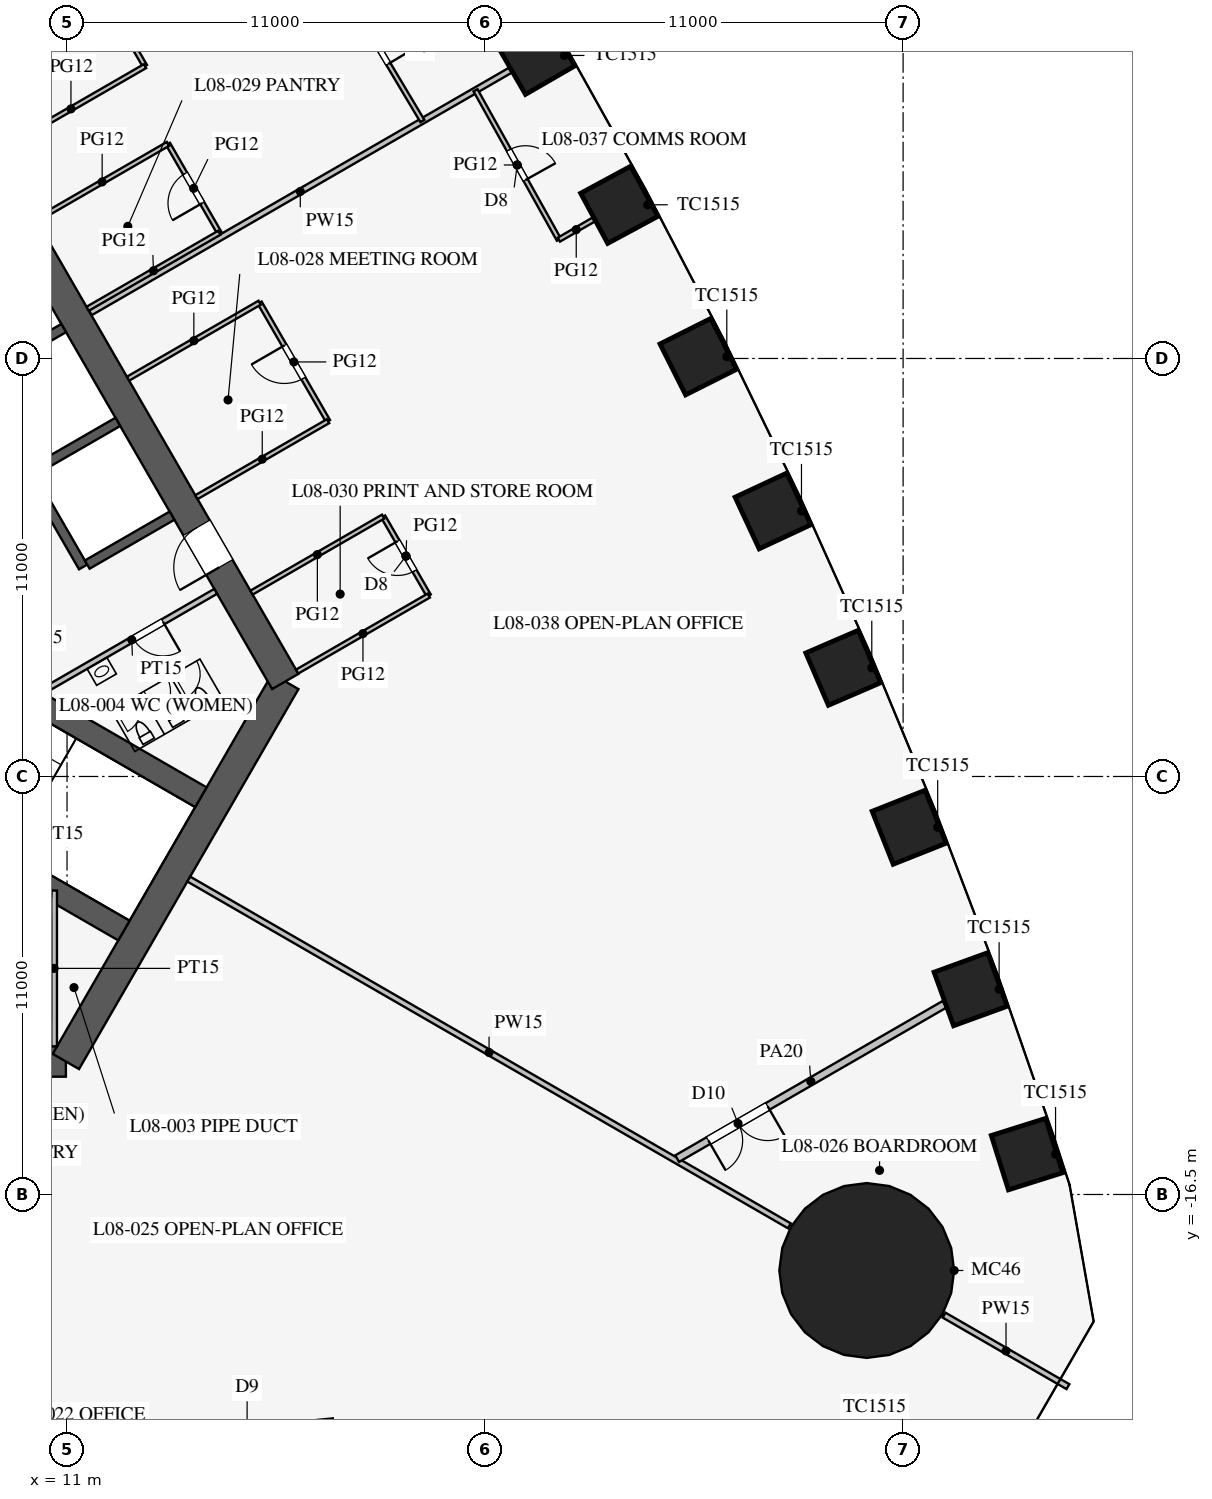
"""IFC4 building model, lengths in metres.
Left out: names, types, materials, properties, quantities, classifications, styles, units other than length and angle.
Written with IfcOpenShell. Run it as: python <this file> out.ifc"""

import sys

from ifc_helpers import new_model, si_unit, direction, frame, frame_2d, origin, origin_2d, place, context, subcontext, project, spatial, rectangle, circle, extrude, element, fill, save


model = new_model("IFC4")
c1 = context("Model", 3, precision=1e-05, world=origin(), true_north=direction((0.0, 1.0)))
c2 = subcontext(c1, "Body", "Model", "MODEL_VIEW")
j1 = project(units=[si_unit("LENGTHUNIT", "METRE"), si_unit("PLANEANGLEUNIT", "RADIAN")], contexts=[c1])
p1 = place(None, origin())
s1 = spatial("IfcSite", under=j1, at=p1, CompositionType="ELEMENT")
p2 = place(p1, origin())
s2 = spatial("IfcBuilding", under=s1, at=p2, CompositionType="ELEMENT")
p3 = place(p2, frame((0.0, 0.0, 37.5)))
s3 = spatial("IfcBuildingStorey", under=s2, at=p3, CompositionType="ELEMENT", Elevation=37.5)
for number, where, z_axis, x_axis in (
    (1, (36.262, -15.438, 0.0), (0.0, 0.0, 1.0), (-0.3, 0.954, 0.0)),
    (2, (34.776, -11.099, 0.0), (0.0, 0.0, 1.0), (-0.342, 0.94, 0.0)),
    (3, (33.16, -6.836, 0.0), (0.0, 0.0, 1.0), (-0.369, 0.929, 0.0)),
    (4, (31.426, -2.641, 0.0), (0.0, 0.0, 1.0), (-0.396, 0.918, 0.0)),
    (5, (29.576, 1.487, 0.0), (0.0, 0.0, 1.0), (-0.423, 0.906, 0.0)),
    (6, (27.611, 5.549, 0.0), (0.0, 0.0, 1.0), (-0.449, 0.894, 0.0)),
    (7, (25.531, 9.544, 0.0), (0.0, 0.0, 1.0), (-0.475, 0.88, 0.0)),
    (8, (23.338, 13.474, 0.0), (0.0, 0.0, 1.0), (-0.5, 0.866, 0.0)),
):
    element("IfcColumn", number, at=place(p3, frame(where, z_axis=z_axis, x_axis=x_axis)), inside=s3, PredefinedType="COLUMN", context=c2, shape_type="SweptSolid", body=[
        extrude(rectangle(XDim=1.5, YDim=1.5, at=origin_2d()), origin(), (0.0, 0.0, 1.0), 4.2),
    ])
p4 = place(p3, frame((32.043, -18.5, 0.0), z_axis=(0.0, 0.0, 1.0), x_axis=(1.0, 0.0, 0.0)))
e9 = element("IfcColumn", 9, at=p4, inside=s3, PredefinedType="COLUMN", context=c2, shape_type="SweptSolid", body=[
    extrude(circle(Radius=2.3, at=origin_2d()), origin(), (0.0, 0.0, 1.0), 4.2),
])
p5 = place(p3, frame((-10.97, -13.0, 0.0), z_axis=(0.0, 0.0, 1.0), x_axis=(1.0, 0.0, 0.0)))
e10 = element("IfcWall", 10, at=p5, inside=s3, PredefinedType="SHEAR", context=c2, shape_type="SweptSolid", body=[
    extrude(rectangle(XDim=21.939, YDim=0.8, at=frame_2d((10.97, 0.0))), origin(), (0.0, 0.0, 1.0), 4.2),
])
p6 = place(p5, frame((17.27, 0.0, 0.0)))
e11 = element("IfcOpeningElement", 11, at=p6, cuts=e10, PredefinedType="OPENING", context=c2, shape_type="SweptSolid", body=[
    extrude(rectangle(XDim=1.2, YDim=2.1, at=frame_2d((0.6, 1.05))), frame((0.0, 0.41, 0.0), z_axis=(0.0, -1.0, 0.0), x_axis=(1.0, 0.0, 0.0)), (0.0, 0.0, 1.0), 0.82),
])
p7 = place(p5, frame((3.47, 0.0, 0.0)))
e12 = element("IfcOpeningElement", 12, at=p7, cuts=e10, PredefinedType="OPENING", context=c2, shape_type="SweptSolid", body=[
    extrude(rectangle(XDim=1.2, YDim=2.1, at=frame_2d((0.6, 1.05))), frame((0.0, 0.41, 0.0), z_axis=(0.0, -1.0, 0.0), x_axis=(1.0, 0.0, 0.0)), (0.0, 0.0, 1.0), 0.82),
])
p8 = place(p3, frame((10.97, -13.0, 0.0), z_axis=(0.0, 0.0, 1.0), x_axis=(0.499995765644, 0.866027848477, 0.0)))
e13 = element("IfcWall", 13, at=p8, inside=s3, PredefinedType="SHEAR", context=c2, shape_type="SweptSolid", body=[
    extrude(rectangle(XDim=11.547, YDim=0.8, at=frame_2d((5.773, 0.0))), origin(), (0.0, 0.0, 1.0), 4.2),
])
p9 = place(p3, frame((16.743, -3.0, 0.0), z_axis=(0.0, 0.0, 1.0), x_axis=(-0.500002442456, 0.866023993627, 0.0)))
e14 = element("IfcWall", 14, at=p9, inside=s3, PredefinedType="SHEAR", context=c2, shape_type="SweptSolid", body=[
    extrude(rectangle(XDim=21.939, YDim=0.8, at=frame_2d((10.97, 0.0))), origin(), (0.0, 0.0, 1.0), 4.2),
])
p10 = place(p9, frame((17.27, 0.0, 0.0)))
e15 = element("IfcOpeningElement", 15, at=p10, cuts=e14, PredefinedType="OPENING", context=c2, shape_type="SweptSolid", body=[
    extrude(rectangle(XDim=1.2, YDim=2.1, at=frame_2d((0.6, 1.05))), frame((0.0, 0.41, 0.0), z_axis=(0.0, -1.0, 0.0), x_axis=(1.0, 0.0, 0.0)), (0.0, 0.0, 1.0), 0.82),
])
p11 = place(p9, frame((3.47, 0.0, 0.0)))
e16 = element("IfcOpeningElement", 16, at=p11, cuts=e14, PredefinedType="OPENING", context=c2, shape_type="SweptSolid", body=[
    extrude(rectangle(XDim=1.2, YDim=2.1, at=frame_2d((0.6, 1.05))), frame((0.0, 0.41, 0.0), z_axis=(0.0, -1.0, 0.0), x_axis=(1.0, 0.0, 0.0)), (0.0, 0.0, 1.0), 0.82),
])
p12 = place(p3, frame((11.424, 0.014, 0.0), z_axis=(0.0, 0.0, 1.0), x_axis=(-0.500001763848, 0.866024385424, 0.0)))
e17 = element("IfcWall", 17, at=p12, inside=s3, PredefinedType="SHEAR", context=c2, shape_type="SweptSolid", body=[
    extrude(rectangle(XDim=11.4, YDim=0.25, at=frame_2d((5.7, 0.0))), origin(), (0.0, 0.0, 1.0), 4.2),
])
for number, where, z_axis, x_axis in (
    (18, (11.532, 0.076, 0.0), (0.0, 0.0, 1.0), (0.866, 0.5, 0.0)),
    (19, (10.107, 2.544, 0.0), (0.0, 0.0, 1.0), (0.866, 0.5, 0.0)),
    (20, (8.682, 5.012, 0.0), (0.0, 0.0, 1.0), (0.866, 0.5, 0.0)),
):
    element("IfcWall", number, at=place(p3, frame(where, z_axis=z_axis, x_axis=x_axis)), inside=s3, PredefinedType="SHEAR", context=c2, shape_type="SweptSolid", body=[
        extrude(rectangle(XDim=2.575, YDim=0.25, at=frame_2d((1.288, 0.0))), origin(), (0.0, 0.0, 1.0), 4.2),
    ])
for number, where, z_axis, x_axis in (
    (21, (4.638, -5.016, 0.0), (0.0, 0.0, 1.0), (0.866, -0.5, 0.0)),
    (22, (6.663, -1.509, 0.0), (0.0, 0.0, 1.0), (0.866, -0.5, 0.0)),
):
    element("IfcWall", number, at=place(p3, frame(where, z_axis=z_axis, x_axis=x_axis)), inside=s3, PredefinedType="SHEAR", context=c2, shape_type="SweptSolid", body=[
        extrude(rectangle(XDim=9.075, YDim=0.6, at=frame_2d((4.538, 0.0))), origin(), (0.0, 0.0, 1.0), 4.2),
    ])
p13 = place(p3, frame((10.495, -3.178, 0.0), z_axis=(0.0, 0.0, 1.0), x_axis=(0.86602216432, 0.500005610874, 0.0)))
e23 = element("IfcWall", 23, at=p13, inside=s3, PredefinedType="PARTITIONING", context=c2, shape_type="SweptSolid", body=[
    extrude(rectangle(XDim=5.1, YDim=0.15, at=frame_2d((2.55, 0.0))), origin(), (0.0, 0.0, 1.0), 4.0),
])
p14 = place(p13, frame((2.6, 0.0, 0.0)))
e24 = element("IfcOpeningElement", 24, at=p14, cuts=e23, PredefinedType="OPENING", context=c2, shape_type="SweptSolid", body=[
    extrude(rectangle(XDim=0.9, YDim=2.1, at=frame_2d((0.45, 1.05))), frame((0.0, 0.085, 0.0), z_axis=(0.0, -1.0, 0.0), x_axis=(1.0, 0.0, 0.0)), (0.0, 0.0, 1.0), 0.17),
])
p15 = place(p3, frame((10.66, -8.5, 0.0), z_axis=(0.0, 0.0, 1.0), x_axis=(0.0, -1.0, 0.0)))
e25 = element("IfcWall", 25, at=p15, inside=s3, PredefinedType="PARTITIONING", context=c2, shape_type="SweptSolid", body=[
    extrude(rectangle(XDim=4.1, YDim=0.15, at=frame_2d((2.05, 0.0))), origin(), (0.0, 0.0, 1.0), 4.0),
])
p16 = place(p3, frame((14.203, -8.2, 0.0), z_axis=(0.0, 0.0, 1.0), x_axis=(0.866024965723, -0.500000758745, 0.0)))
e26 = element("IfcWall", 26, at=p16, inside=s3, PredefinedType="PARTITIONING", context=c2, shape_type="SweptSolid", body=[
    extrude(rectangle(XDim=18.25, YDim=0.15, at=frame_2d((9.125, 0.0))), origin(), (0.0, 0.0, 1.0), 2.3),
])
p17 = place(p3, frame((34.078, -19.675, 0.0), z_axis=(0.0, 0.0, 1.0), x_axis=(0.866019247219, -0.500010663332, 0.0)))
e27 = element("IfcWall", 27, at=p17, inside=s3, PredefinedType="PARTITIONING", context=c2, shape_type="SweptSolid", body=[
    extrude(rectangle(XDim=3.764, YDim=0.15, at=frame_2d((1.882, 0.0))), origin(), (0.0, 0.0, 1.0), 2.3),
])
p18 = place(p3, frame((13.5, -22.91, 0.0), z_axis=(0.0, 0.0, 1.0), x_axis=(0.994833141332, 0.101523499286, 0.0)))
e28 = element("IfcWall", 28, at=p18, inside=s3, PredefinedType="PARTITIONING", context=c2, shape_type="SweptSolid", body=[
    extrude(rectangle(XDim=4.523, YDim=0.12, at=frame_2d((2.262, 0.0))), origin(), (0.0, 0.0, 1.0), 2.9),
])
p19 = place(p18, frame((1.75, 0.0, 0.15)))
e29 = element("IfcOpeningElement", 29, at=p19, cuts=e28, PredefinedType="OPENING", context=c2, shape_type="SweptSolid", body=[
    extrude(rectangle(XDim=1.0, YDim=2.1, at=frame_2d((0.5, 1.05))), frame((0.0, 0.07, 0.0), z_axis=(0.0, -1.0, 0.0), x_axis=(1.0, 0.0, 0.0)), (0.0, 0.0, 1.0), 0.14),
])
p20 = place(p3, frame((11.613, 6.705, 0.0), z_axis=(0.0, 0.0, 1.0), x_axis=(0.86602785495, 0.499995754432, 0.0)))
e30 = element("IfcWall", 30, at=p20, inside=s3, PredefinedType="PARTITIONING", context=c2, shape_type="SweptSolid", body=[
    extrude(rectangle(XDim=12.759, YDim=0.15, at=frame_2d((6.379, 0.0))), origin(), (0.0, 0.0, 1.0), 3.2),
])
p21 = place(p3, frame((15.006, 8.808, 0.0), z_axis=(0.0, 0.0, 1.0), x_axis=(-0.500048589285, 0.86599734893, 0.0)))
e31 = element("IfcWall", 31, at=p21, inside=s3, PredefinedType="PARTITIONING", context=c2, shape_type="SweptSolid", body=[
    extrude(rectangle(XDim=2.7, YDim=0.12, at=frame_2d((1.35, 0.0))), origin(), (0.0, 0.0, 1.0), 2.9),
])
p22 = place(p21, frame((0.9, 0.0, 0.15)))
e32 = element("IfcOpeningElement", 32, at=p22, cuts=e31, PredefinedType="OPENING", context=c2, shape_type="SweptSolid", body=[
    extrude(rectangle(XDim=0.9, YDim=2.1, at=frame_2d((0.45, 1.05))), frame((0.0, 0.07, 0.0), z_axis=(0.0, -1.0, 0.0), x_axis=(1.0, 0.0, 0.0)), (0.0, 0.0, 1.0), 0.14),
])
p23 = place(p3, frame((13.052, 13.194, 0.0), z_axis=(0.0, 0.0, 1.0), x_axis=(-0.499977259774, 0.866038532462, 0.0)))
e33 = element("IfcWall", 33, at=p23, inside=s3, PredefinedType="PARTITIONING", context=c2, shape_type="SweptSolid", body=[
    extrude(rectangle(XDim=4.7, YDim=0.12, at=frame_2d((2.35, 0.0))), origin(), (0.0, 0.0, 1.0), 2.9),
])
p24 = place(p23, frame((1.45, 0.0, 0.15)))
e34 = element("IfcOpeningElement", 34, at=p24, cuts=e33, PredefinedType="OPENING", context=c2, shape_type="SweptSolid", body=[
    extrude(rectangle(XDim=1.8, YDim=2.1, at=frame_2d((0.9, 1.05))), frame((0.0, 0.07, 0.0), z_axis=(0.0, -1.0, 0.0), x_axis=(1.0, 0.0, 0.0)), (0.0, 0.0, 1.0), 0.14),
])
p25 = place(p3, frame((20.519, -0.74, 0.0), z_axis=(0.0, 0.0, 1.0), x_axis=(-0.499957262057, 0.866050077142, 0.0)))
e35 = element("IfcWall", 35, at=p25, inside=s3, PredefinedType="PARTITIONING", context=c2, shape_type="SweptSolid", body=[
    extrude(rectangle(XDim=2.4, YDim=0.12, at=frame_2d((1.2, 0.0))), origin(), (0.0, 0.0, 1.0), 2.9),
])
p26 = place(p25, frame((0.75, 0.0, 0.15)))
e36 = element("IfcOpeningElement", 36, at=p26, cuts=e35, PredefinedType="OPENING", context=c2, shape_type="SweptSolid", body=[
    extrude(rectangle(XDim=0.9, YDim=2.1, at=frame_2d((0.45, 1.05))), frame((0.0, 0.07, 0.0), z_axis=(0.0, -1.0, 0.0), x_axis=(1.0, 0.0, 0.0)), (0.0, 0.0, 1.0), 0.14),
])
p27 = place(p3, frame((17.869, 3.85, 0.0), z_axis=(0.0, 0.0, 1.0), x_axis=(-0.500012057535, 0.866018442252, 0.0)))
e37 = element("IfcWall", 37, at=p27, inside=s3, PredefinedType="PARTITIONING", context=c2, shape_type="SweptSolid", body=[
    extrude(rectangle(XDim=3.6, YDim=0.12, at=frame_2d((1.8, 0.0))), origin(), (0.0, 0.0, 1.0), 2.9),
])
p28 = place(p27, frame((1.3, 0.0, 0.15)))
e38 = element("IfcOpeningElement", 38, at=p28, cuts=e37, PredefinedType="OPENING", context=c2, shape_type="SweptSolid", body=[
    extrude(rectangle(XDim=1.0, YDim=2.1, at=frame_2d((0.5, 1.05))), frame((0.0, 0.07, 0.0), z_axis=(0.0, -1.0, 0.0), x_axis=(1.0, 0.0, 0.0)), (0.0, 0.0, 1.0), 0.14),
])
for number, where, z_axis, x_axis in (
    (39, (11.542, 6.808, 0.0), (0.0, 0.0, 1.0), (0.866, 0.5, 0.0)),
    (40, (10.192, 9.146, 0.0), (0.0, 0.0, 1.0), (0.866, 0.5, 0.0)),
):
    element("IfcWall", number, at=place(p3, frame(where, z_axis=z_axis, x_axis=x_axis)), inside=s3, PredefinedType="PARTITIONING", context=c2, shape_type="SweptSolid", body=[
        extrude(rectangle(XDim=4.0, YDim=0.12, at=frame_2d((2.0, 0.0))), origin(), (0.0, 0.0, 1.0), 2.9),
    ])
p29 = place(p3, frame((9.155, 10.944, 0.0), z_axis=(0.0, 0.0, 1.0), x_axis=(0.866017533419, 0.500013631625, 0.0)))
e41 = element("IfcWall", 41, at=p29, inside=s3, PredefinedType="PARTITIONING", context=c2, shape_type="SweptSolid", body=[
    extrude(rectangle(XDim=4.5, YDim=0.12, at=frame_2d((2.25, 0.0))), origin(), (0.0, 0.0, 1.0), 2.9),
])
for number, where, z_axis, x_axis in (
    (42, (17.055, -2.74, 0.0), (0.0, 0.0, 1.0), (0.866, 0.5, 0.0)),
    (43, (12.605, 4.968, 0.0), (0.0, 0.0, 1.0), (0.866, 0.5, 0.0)),
    (44, (14.405, 1.85, 0.0), (0.0, 0.0, 1.0), (0.866, 0.5, 0.0)),
    (45, (15.855, -0.661, 0.0), (0.0, 0.0, 1.0), (0.866, 0.5, 0.0)),
):
    element("IfcWall", number, at=place(p3, frame(where, z_axis=z_axis, x_axis=x_axis)), inside=s3, PredefinedType="PARTITIONING", context=c2, shape_type="SweptSolid", body=[
        extrude(rectangle(XDim=4.0, YDim=0.12, at=frame_2d((2.0, 0.0))), origin(), (0.0, 0.0, 1.0), 2.9),
    ])
p30 = place(p3, frame((20.351, 11.749, 0.0), z_axis=(0.0, 0.0, 1.0), x_axis=(-0.51252396108, 0.858672923364, 0.0)))
e46 = element("IfcWall", 46, at=p30, inside=s3, PredefinedType="PARTITIONING", context=c2, shape_type="SweptSolid", body=[
    extrude(rectangle(XDim=4.5, YDim=0.12, at=frame_2d((2.25, 0.0))), origin(), (0.0, 0.0, 1.0), 2.9),
])
p31 = place(p30, frame((1.75, 0.0, 0.15)))
e47 = element("IfcOpeningElement", 47, at=p31, cuts=e46, PredefinedType="OPENING", context=c2, shape_type="SweptSolid", body=[
    extrude(rectangle(XDim=1.0, YDim=2.1, at=frame_2d((0.5, 1.05))), frame((0.0, 0.07, 0.0), z_axis=(0.0, -1.0, 0.0), x_axis=(1.0, 0.0, 0.0)), (0.0, 0.0, 1.0), 0.14),
])
p32 = place(p3, frame((23.943, 8.627, 0.0), z_axis=(0.0, 0.0, 1.0), x_axis=(-0.487415216275, 0.87317031955, 0.0)))
e48 = element("IfcWall", 48, at=p32, inside=s3, PredefinedType="PARTITIONING", context=c2, shape_type="SweptSolid", body=[
    extrude(rectangle(XDim=4.5, YDim=0.12, at=frame_2d((2.25, 0.0))), origin(), (0.0, 0.0, 1.0), 2.9),
])
p33 = place(p32, frame((1.8, 0.0, 0.15)))
e49 = element("IfcOpeningElement", 49, at=p33, cuts=e48, PredefinedType="OPENING", context=c2, shape_type="SweptSolid", body=[
    extrude(rectangle(XDim=0.9, YDim=2.1, at=frame_2d((0.45, 1.05))), frame((0.0, 0.07, 0.0), z_axis=(0.0, -1.0, 0.0), x_axis=(1.0, 0.0, 0.0)), (0.0, 0.0, 1.0), 0.14),
])
p34 = place(p3, frame((27.055, -15.557, 0.0), z_axis=(0.0, 0.0, 1.0), x_axis=(0.866026445548, 0.499998195608, 0.0)))
e50 = element("IfcWall", 50, at=p34, inside=s3, PredefinedType="PARTITIONING", context=c2, shape_type="SweptSolid", body=[
    extrude(rectangle(XDim=8.124, YDim=0.2, at=frame_2d((4.062, 0.0))), origin(), (0.0, 0.0, 1.0), 2.9),
])
p35 = place(p34, frame((0.95, 0.0, 0.15)))
e51 = element("IfcOpeningElement", 51, at=p35, cuts=e50, PredefinedType="OPENING", context=c2, shape_type="SweptSolid", body=[
    extrude(rectangle(XDim=1.8, YDim=2.1, at=frame_2d((0.9, 1.05))), frame((0.0, 0.11, 0.0), z_axis=(0.0, -1.0, 0.0), x_axis=(1.0, 0.0, 0.0)), (0.0, 0.0, 1.0), 0.22),
])
p36 = place(p3, frame((23.943, 8.627, 0.0), z_axis=(0.0, 0.0, 1.0), x_axis=(0.866054481515, 0.499949632511, 0.0)))
e52 = element("IfcWall", 52, at=p36, inside=s3, PredefinedType="PARTITIONING", context=c2, shape_type="SweptSolid", body=[
    extrude(rectangle(XDim=1.054, YDim=0.12, at=frame_2d((0.527, 0.0))), origin(), (0.0, 0.0, 1.0), 2.9),
])
p37 = place(p14, frame((0.9, 0.0, 0.0), z_axis=(0.0, 0.0, 1.0), x_axis=(-1.0, 0.0, 0.0)))
e53 = element("IfcDoor", 53, at=p37, inside=s3, OperationType="SINGLE_SWING_LEFT", PredefinedType="DOOR", context=c2, shape_type="SweptSolid", body=[
    extrude(rectangle(XDim=0.9, YDim=2.1, at=frame_2d((0.45, 1.05))), frame((0.0, 0.025, 0.0), z_axis=(0.0, -1.0, 0.0), x_axis=(1.0, 0.0, 0.0)), (0.0, 0.0, 1.0), 0.05),
])
fill(e24, e53)
p38 = place(p11, origin())
e54 = element("IfcDoor", 54, at=p38, inside=s3, OperationType="SINGLE_SWING_LEFT", PredefinedType="DOOR", context=c2, shape_type="SweptSolid", body=[
    extrude(rectangle(XDim=1.2, YDim=2.1, at=frame_2d((0.6, 1.05))), frame((0.0, 0.025, 0.0), z_axis=(0.0, -1.0, 0.0), x_axis=(1.0, 0.0, 0.0)), (0.0, 0.0, 1.0), 0.05),
])
fill(e16, e54)
p39 = place(p35, frame((1.8, 0.0, 0.0), z_axis=(0.0, 0.0, 1.0), x_axis=(-1.0, 0.0, 0.0)))
e55 = element("IfcDoor", 55, at=p39, inside=s3, OperationType="DOUBLE_DOOR_SINGLE_SWING", PredefinedType="DOOR", context=c2, shape_type="SweptSolid", body=[
    extrude(rectangle(XDim=1.8, YDim=2.1, at=frame_2d((0.9, 1.05))), frame((0.0, 0.025, 0.0), z_axis=(0.0, -1.0, 0.0), x_axis=(1.0, 0.0, 0.0)), (0.0, 0.0, 1.0), 0.05),
])
fill(e51, e55)
p40 = place(p28, origin())
e56 = element("IfcDoor", 56, at=p40, inside=s3, OperationType="SINGLE_SWING_RIGHT", PredefinedType="DOOR", context=c2, shape_type="SweptSolid", body=[
    extrude(rectangle(XDim=1.0, YDim=2.1, at=frame_2d((0.5, 1.05))), frame((0.0, 0.025, 0.0), z_axis=(0.0, -1.0, 0.0), x_axis=(1.0, 0.0, 0.0)), (0.0, 0.0, 1.0), 0.05),
])
fill(e38, e56)
p41 = place(p22, origin())
e57 = element("IfcDoor", 57, at=p41, inside=s3, OperationType="SINGLE_SWING_LEFT", PredefinedType="DOOR", context=c2, shape_type="SweptSolid", body=[
    extrude(rectangle(XDim=0.9, YDim=2.1, at=frame_2d((0.45, 1.05))), frame((0.0, 0.025, 0.0), z_axis=(0.0, -1.0, 0.0), x_axis=(1.0, 0.0, 0.0)), (0.0, 0.0, 1.0), 0.05),
])
fill(e32, e57)
p42 = place(p26, origin())
e58 = element("IfcDoor", 58, at=p42, inside=s3, OperationType="SINGLE_SWING_RIGHT", PredefinedType="DOOR", context=c2, shape_type="SweptSolid", body=[
    extrude(rectangle(XDim=0.9, YDim=2.1, at=frame_2d((0.45, 1.05))), frame((0.0, 0.025, 0.0), z_axis=(0.0, -1.0, 0.0), x_axis=(1.0, 0.0, 0.0)), (0.0, 0.0, 1.0), 0.05),
])
fill(e36, e58)
p43 = place(p31, frame((1.0, 0.0, 0.0), z_axis=(0.0, 0.0, 1.0), x_axis=(-1.0, 0.0, 0.0)))
e59 = element("IfcDoor", 59, at=p43, inside=s3, OperationType="SINGLE_SWING_RIGHT", PredefinedType="DOOR", context=c2, shape_type="SweptSolid", body=[
    extrude(rectangle(XDim=1.0, YDim=2.1, at=frame_2d((0.5, 1.05))), frame((0.0, 0.025, 0.0), z_axis=(0.0, -1.0, 0.0), x_axis=(1.0, 0.0, 0.0)), (0.0, 0.0, 1.0), 0.05),
])
fill(e47, e59)
p44 = place(p33, frame((0.9, 0.0, 0.0), z_axis=(0.0, 0.0, 1.0), x_axis=(-1.0, 0.0, 0.0)))
e60 = element("IfcDoor", 60, at=p44, inside=s3, OperationType="SINGLE_SWING_RIGHT", PredefinedType="DOOR", context=c2, shape_type="SweptSolid", body=[
    extrude(rectangle(XDim=0.9, YDim=2.1, at=frame_2d((0.45, 1.05))), frame((0.0, 0.025, 0.0), z_axis=(0.0, -1.0, 0.0), x_axis=(1.0, 0.0, 0.0)), (0.0, 0.0, 1.0), 0.05),
])
fill(e49, e60)
save(model, sys.argv[1])
